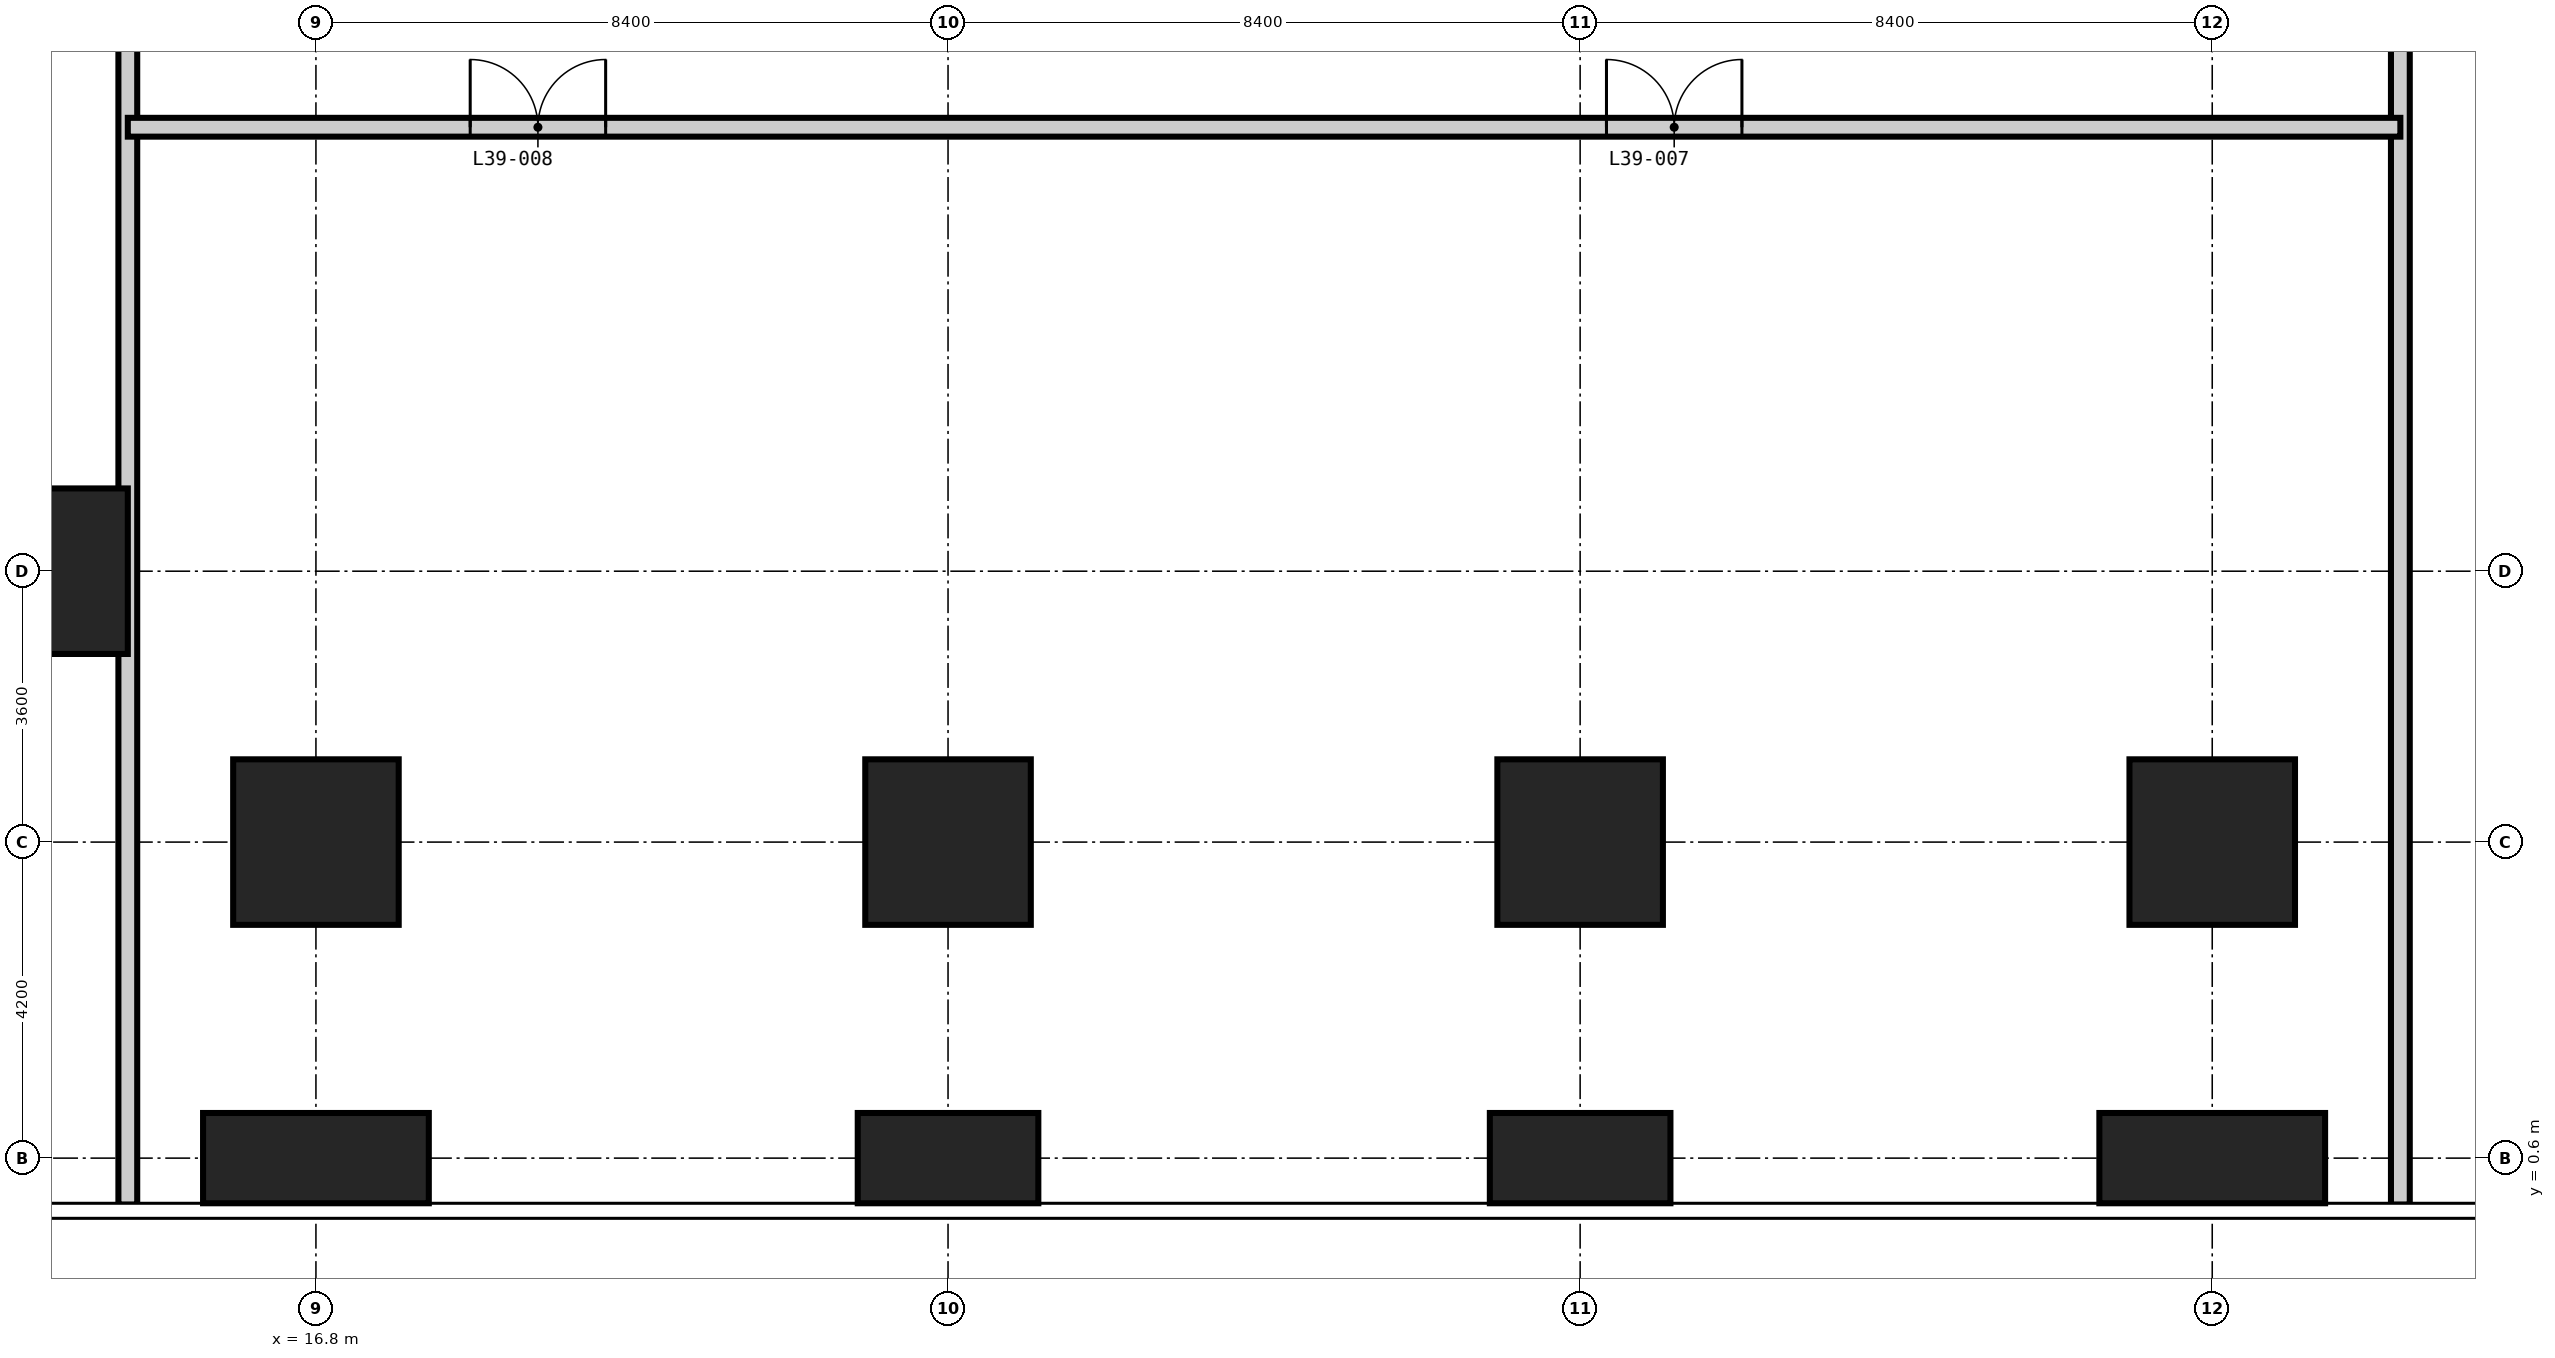
"""IFC4 building model, lengths in metres.
Left out: names, types, materials, properties, quantities, classifications, styles, units other than length and angle.
Written with IfcOpenShell. Run it as: python <this file> out.ifc"""

import sys

from ifc_helpers import new_model, si_unit, direction, frame, frame_2d, origin, origin_2d, place, context, subcontext, project, spatial, rectangle, extrude, element, fill, save


model = new_model("IFC4")
c1 = context("Model", 3, precision=1e-05, world=origin(), true_north=direction((0.0, 1.0)))
c2 = subcontext(c1, "Body", "Model", "MODEL_VIEW")
j1 = project(units=[si_unit("LENGTHUNIT", "METRE"), si_unit("PLANEANGLEUNIT", "RADIAN")], contexts=[c1])
p1 = place(None, origin())
s1 = spatial("IfcSite", under=j1, at=p1, CompositionType="ELEMENT")
p2 = place(p1, origin())
s2 = spatial("IfcBuilding", under=s1, at=p2, CompositionType="ELEMENT")
p3 = place(p2, frame((0.0, 0.0, 153.6)))
s3 = spatial("IfcBuildingStorey", under=s2, at=p3, CompositionType="ELEMENT", Elevation=153.6)
p4 = place(p3, frame((13.2, 8.4, -0.4), z_axis=(0.0, 0.0, 1.0), x_axis=(1.0, 0.0, 0.0)))
e1 = element("IfcColumn", 1, at=p4, inside=s3, PredefinedType="COLUMN", context=c2, shape_type="SweptSolid", body=[
    extrude(rectangle(XDim=2.2, YDim=2.2, at=origin_2d()), origin(), (0.0, 0.0, 1.0), 5.45),
])
p5 = place(p3, frame((16.8, 0.6, -0.4), z_axis=(0.0, 0.0, 1.0), x_axis=(1.0, 0.0, 0.0)))
e2 = element("IfcColumn", 2, at=p5, inside=s3, PredefinedType="COLUMN", context=c2, shape_type="SweptSolid", body=[
    extrude(rectangle(XDim=3.0, YDim=1.2, at=origin_2d()), origin(), (0.0, 0.0, 1.0), 5.45),
])
p6 = place(p3, frame((16.8, 4.8, -0.4), z_axis=(0.0, 0.0, 1.0), x_axis=(1.0, 0.0, 0.0)))
e3 = element("IfcColumn", 3, at=p6, inside=s3, PredefinedType="COLUMN", context=c2, shape_type="SweptSolid", body=[
    extrude(rectangle(XDim=2.2, YDim=2.2, at=origin_2d()), origin(), (0.0, 0.0, 1.0), 5.45),
])
p7 = place(p3, frame((25.2, 0.6, -0.4), z_axis=(0.0, 0.0, 1.0), x_axis=(1.0, 0.0, 0.0)))
e4 = element("IfcColumn", 4, at=p7, inside=s3, PredefinedType="COLUMN", context=c2, shape_type="SweptSolid", body=[
    extrude(rectangle(XDim=2.4, YDim=1.2, at=origin_2d()), origin(), (0.0, 0.0, 1.0), 5.45),
])
p8 = place(p3, frame((25.2, 4.8, -0.4), z_axis=(0.0, 0.0, 1.0), x_axis=(1.0, 0.0, 0.0)))
e5 = element("IfcColumn", 5, at=p8, inside=s3, PredefinedType="COLUMN", context=c2, shape_type="SweptSolid", body=[
    extrude(rectangle(XDim=2.2, YDim=2.2, at=origin_2d()), origin(), (0.0, 0.0, 1.0), 5.45),
])
p9 = place(p3, frame((33.6, 0.6, -0.4), z_axis=(0.0, 0.0, 1.0), x_axis=(1.0, 0.0, 0.0)))
e6 = element("IfcColumn", 6, at=p9, inside=s3, PredefinedType="COLUMN", context=c2, shape_type="SweptSolid", body=[
    extrude(rectangle(XDim=2.4, YDim=1.2, at=origin_2d()), origin(), (0.0, 0.0, 1.0), 5.45),
])
p10 = place(p3, frame((33.6, 4.8, -0.4), z_axis=(0.0, 0.0, 1.0), x_axis=(1.0, 0.0, 0.0)))
e7 = element("IfcColumn", 7, at=p10, inside=s3, PredefinedType="COLUMN", context=c2, shape_type="SweptSolid", body=[
    extrude(rectangle(XDim=2.2, YDim=2.2, at=origin_2d()), origin(), (0.0, 0.0, 1.0), 5.45),
])
p11 = place(p3, frame((42.0, 0.6, -0.4), z_axis=(0.0, 0.0, 1.0), x_axis=(1.0, 0.0, 0.0)))
e8 = element("IfcColumn", 8, at=p11, inside=s3, PredefinedType="COLUMN", context=c2, shape_type="SweptSolid", body=[
    extrude(rectangle(XDim=3.0, YDim=1.2, at=origin_2d()), origin(), (0.0, 0.0, 1.0), 5.45),
])
p12 = place(p3, frame((42.0, 4.8, -0.4), z_axis=(0.0, 0.0, 1.0), x_axis=(1.0, 0.0, 0.0)))
e9 = element("IfcColumn", 9, at=p12, inside=s3, PredefinedType="COLUMN", context=c2, shape_type="SweptSolid", body=[
    extrude(rectangle(XDim=2.2, YDim=2.2, at=origin_2d()), origin(), (0.0, 0.0, 1.0), 5.45),
])
p13 = place(p3, frame((14.3, -0.018, 0.0), z_axis=(0.0, 0.0, 1.0), x_axis=(0.0, 1.0, 0.0)))
e10 = element("IfcWall", 10, at=p13, inside=s3, PredefinedType="PARTITIONING", context=c2, shape_type="SweptSolid", body=[
    extrude(rectangle(XDim=54.636, YDim=0.25, at=frame_2d((27.318, 0.0))), origin(), (0.0, 0.0, 1.0), 5.05),
])
p14 = place(p13, frame((22.168, 0.0, 0.0)))
e11 = element("IfcOpeningElement", 11, at=p14, cuts=e10, PredefinedType="OPENING", context=c2, shape_type="SweptSolid", body=[
    extrude(rectangle(XDim=1.8, YDim=2.4, at=frame_2d((0.9, 1.2))), frame((0.0, 0.135, 0.0), z_axis=(0.0, -1.0, 0.0), x_axis=(1.0, 0.0, 0.0)), (0.0, 0.0, 1.0), 0.27),
])
p15 = place(p13, frame((38.168, 0.0, 0.0)))
e12 = element("IfcOpeningElement", 12, at=p15, cuts=e10, PredefinedType="OPENING", context=c2, shape_type="SweptSolid", body=[
    extrude(rectangle(XDim=1.8, YDim=2.4, at=frame_2d((0.9, 1.2))), frame((0.0, 0.135, 0.0), z_axis=(0.0, -1.0, 0.0), x_axis=(1.0, 0.0, 0.0)), (0.0, 0.0, 1.0), 0.27),
])
p16 = place(p3, frame((44.5, -0.018, 0.0), z_axis=(0.0, 0.0, 1.0), x_axis=(0.0, 1.0, 0.0)))
e13 = element("IfcWall", 13, at=p16, inside=s3, PredefinedType="PARTITIONING", context=c2, shape_type="SweptSolid", body=[
    extrude(rectangle(XDim=54.636, YDim=0.25, at=frame_2d((27.318, 0.0))), origin(), (0.0, 0.0, 1.0), 5.05),
])
p17 = place(p16, frame((20.968, 0.0, 0.0)))
e14 = element("IfcOpeningElement", 14, at=p17, cuts=e13, PredefinedType="OPENING", context=c2, shape_type="SweptSolid", body=[
    extrude(rectangle(XDim=1.8, YDim=2.4, at=frame_2d((0.9, 1.2))), frame((0.0, 0.135, 0.0), z_axis=(0.0, -1.0, 0.0), x_axis=(1.0, 0.0, 0.0)), (0.0, 0.0, 1.0), 0.27),
])
p18 = place(p16, frame((38.168, 0.0, 0.0)))
e15 = element("IfcOpeningElement", 15, at=p18, cuts=e13, PredefinedType="OPENING", context=c2, shape_type="SweptSolid", body=[
    extrude(rectangle(XDim=1.8, YDim=2.4, at=frame_2d((0.9, 1.2))), frame((0.0, 0.135, 0.0), z_axis=(0.0, -1.0, 0.0), x_axis=(1.0, 0.0, 0.0)), (0.0, 0.0, 1.0), 0.27),
])
p19 = place(p3, frame((14.3, 14.3, 0.0), z_axis=(0.0, 0.0, 1.0), x_axis=(1.0, 0.0, 0.0)))
e16 = element("IfcWall", 16, at=p19, inside=s3, PredefinedType="PARTITIONING", context=c2, shape_type="SweptSolid", body=[
    extrude(rectangle(XDim=30.2, YDim=0.25, at=frame_2d((15.1, 0.0))), origin(), (0.0, 0.0, 1.0), 5.05),
])
p20 = place(p19, frame((19.65, 0.0, 0.0)))
e17 = element("IfcOpeningElement", 17, at=p20, cuts=e16, PredefinedType="OPENING", context=c2, shape_type="SweptSolid", body=[
    extrude(rectangle(XDim=1.8, YDim=2.4, at=frame_2d((0.9, 1.2))), frame((0.0, 0.135, 0.0), z_axis=(0.0, -1.0, 0.0), x_axis=(1.0, 0.0, 0.0)), (0.0, 0.0, 1.0), 0.27),
])
p21 = place(p19, frame((4.55, 0.0, 0.0)))
e18 = element("IfcOpeningElement", 18, at=p21, cuts=e16, PredefinedType="OPENING", context=c2, shape_type="SweptSolid", body=[
    extrude(rectangle(XDim=1.8, YDim=2.4, at=frame_2d((0.9, 1.2))), frame((0.0, 0.135, 0.0), z_axis=(0.0, -1.0, 0.0), x_axis=(1.0, 0.0, 0.0)), (0.0, 0.0, 1.0), 0.27),
])
p22 = place(p20, origin())
e19 = element("IfcDoor", 19, at=p22, inside=s3, OperationType="DOUBLE_DOOR_DOUBLE_SWING", PredefinedType="DOOR", context=c2, shape_type="SweptSolid", body=[
    extrude(rectangle(XDim=1.8, YDim=2.4, at=frame_2d((0.9, 1.2))), frame((0.0, 0.025, 0.0), z_axis=(0.0, -1.0, 0.0), x_axis=(1.0, 0.0, 0.0)), (0.0, 0.0, 1.0), 0.05),
])
fill(e17, e19)
p23 = place(p21, origin())
e20 = element("IfcDoor", 20, at=p23, inside=s3, OperationType="DOUBLE_DOOR_DOUBLE_SWING", PredefinedType="DOOR", context=c2, shape_type="SweptSolid", body=[
    extrude(rectangle(XDim=1.8, YDim=2.4, at=frame_2d((0.9, 1.2))), frame((0.0, 0.025, 0.0), z_axis=(0.0, -1.0, 0.0), x_axis=(1.0, 0.0, 0.0)), (0.0, 0.0, 1.0), 0.05),
])
fill(e18, e20)
save(model, sys.argv[1])
